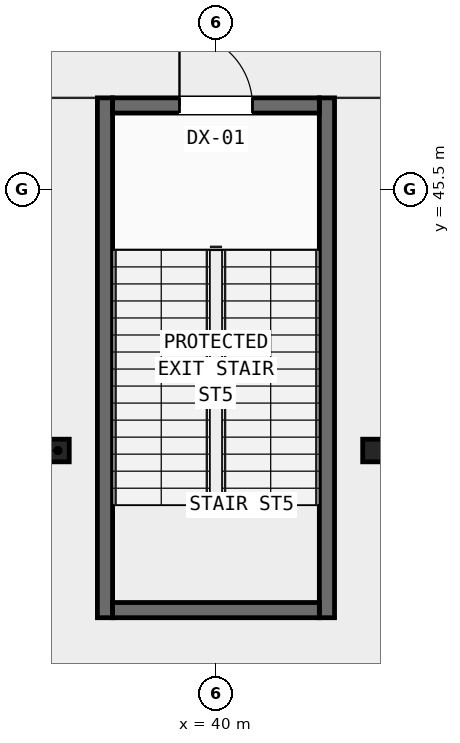
"""IFC4 building model, lengths in metres.
Left out: names, types, materials, properties, quantities, classifications, styles, units other than length and angle.
Written with IfcOpenShell. Run it as: python <this file> out.ifc"""

import sys

from ifc_helpers import new_model, si_unit, direction, frame, frame_2d, origin, origin_2d, place, context, subcontext, project, spatial, rectangle, i_section, extrude, element, fill, save


model = new_model("IFC4")
c1 = context("Model", 3, precision=1e-05, world=origin(), true_north=direction((0.0, 1.0)))
c2 = subcontext(c1, "Body", "Model", "MODEL_VIEW")
j1 = project(units=[si_unit("LENGTHUNIT", "METRE"), si_unit("PLANEANGLEUNIT", "RADIAN")], contexts=[c1])
p1 = place(None, origin())
s1 = spatial("IfcSite", under=j1, at=p1, CompositionType="ELEMENT")
p2 = place(p1, origin())
s2 = spatial("IfcBuilding", under=s1, at=p2, CompositionType="ELEMENT")
p3 = place(p2, origin())
s3 = spatial("IfcBuildingStorey", under=s2, at=p3, CompositionType="ELEMENT", Elevation=0.0)
for number, where, z_axis, x_axis in (
    (1, (37.4, 41.2, 0.0), (0.0, 0.0, 1.0), (1.0, 0.0, 0.0)),
    (2, (42.6, 41.2, 0.0), (0.0, 0.0, 1.0), (1.0, 0.0, 0.0)),
):
    element("IfcColumn", number, at=place(p3, frame(where, z_axis=z_axis, x_axis=x_axis)), inside=s3, PredefinedType="COLUMN", context=c2, shape_type="SweptSolid", body=[
        extrude(i_section(OverallWidth=0.374, OverallDepth=0.372, WebThickness=0.016, FlangeThickness=0.026, at=origin_2d()), origin(), (0.0, 0.0, 1.0), 5.5),
    ])
for number, where, z_axis, x_axis in (
    (3, (38.175, 38.45, 0.0), (0.0, 0.0, 1.0), (0.0, 1.0, 0.0)),
    (4, (41.825, 38.45, 0.0), (0.0, 0.0, 1.0), (0.0, 1.0, 0.0)),
):
    element("IfcWall", number, at=place(p3, frame(where, z_axis=z_axis, x_axis=x_axis)), inside=s3, PredefinedType="SHEAR", context=c2, shape_type="SweptSolid", body=[
        extrude(rectangle(XDim=8.55, YDim=0.25, at=frame_2d((4.275, 0.0))), origin(), (0.0, 0.0, 1.0), 5.22),
    ])
p4 = place(p3, frame((38.3, 38.575, 0.0), z_axis=(0.0, 0.0, 1.0), x_axis=(1.0, 0.0, 0.0)))
e5 = element("IfcWall", 5, at=p4, inside=s3, PredefinedType="SHEAR", context=c2, shape_type="SweptSolid", body=[
    extrude(rectangle(XDim=3.4, YDim=0.25, at=frame_2d((1.7, 0.0))), origin(), (0.0, 0.0, 1.0), 5.22),
])
p5 = place(p3, frame((38.3, 46.875, 0.0), z_axis=(0.0, 0.0, 1.0), x_axis=(1.0, 0.0, 0.0)))
e6 = element("IfcWall", 6, at=p5, inside=s3, PredefinedType="SHEAR", context=c2, shape_type="SweptSolid", body=[
    extrude(rectangle(XDim=3.4, YDim=0.25, at=frame_2d((1.7, 0.0))), origin(), (0.0, 0.0, 1.0), 5.22),
])
p6 = place(p5, frame((1.1, 0.0, 0.0)))
e7 = element("IfcOpeningElement", 7, at=p6, cuts=e6, PredefinedType="OPENING", context=c2, shape_type="SweptSolid", body=[
    extrude(rectangle(XDim=1.2, YDim=2.2, at=frame_2d((0.6, 1.1))), frame((0.0, 0.135, 0.0), z_axis=(0.0, -1.0, 0.0), x_axis=(1.0, 0.0, 0.0)), (0.0, 0.0, 1.0), 0.27),
])
p7 = place(p6, origin())
e8 = element("IfcDoor", 8, at=p7, inside=s3, OperationType="SINGLE_SWING_LEFT", PredefinedType="DOOR", context=c2, shape_type="SweptSolid", body=[
    extrude(rectangle(XDim=1.2, YDim=2.2, at=frame_2d((0.6, 1.1))), frame((0.0, 0.025, 0.0), z_axis=(0.0, -1.0, 0.0), x_axis=(1.0, 0.0, 0.0)), (0.0, 0.0, 1.0), 0.05),
])
fill(e7, e8)
save(model, sys.argv[1])
